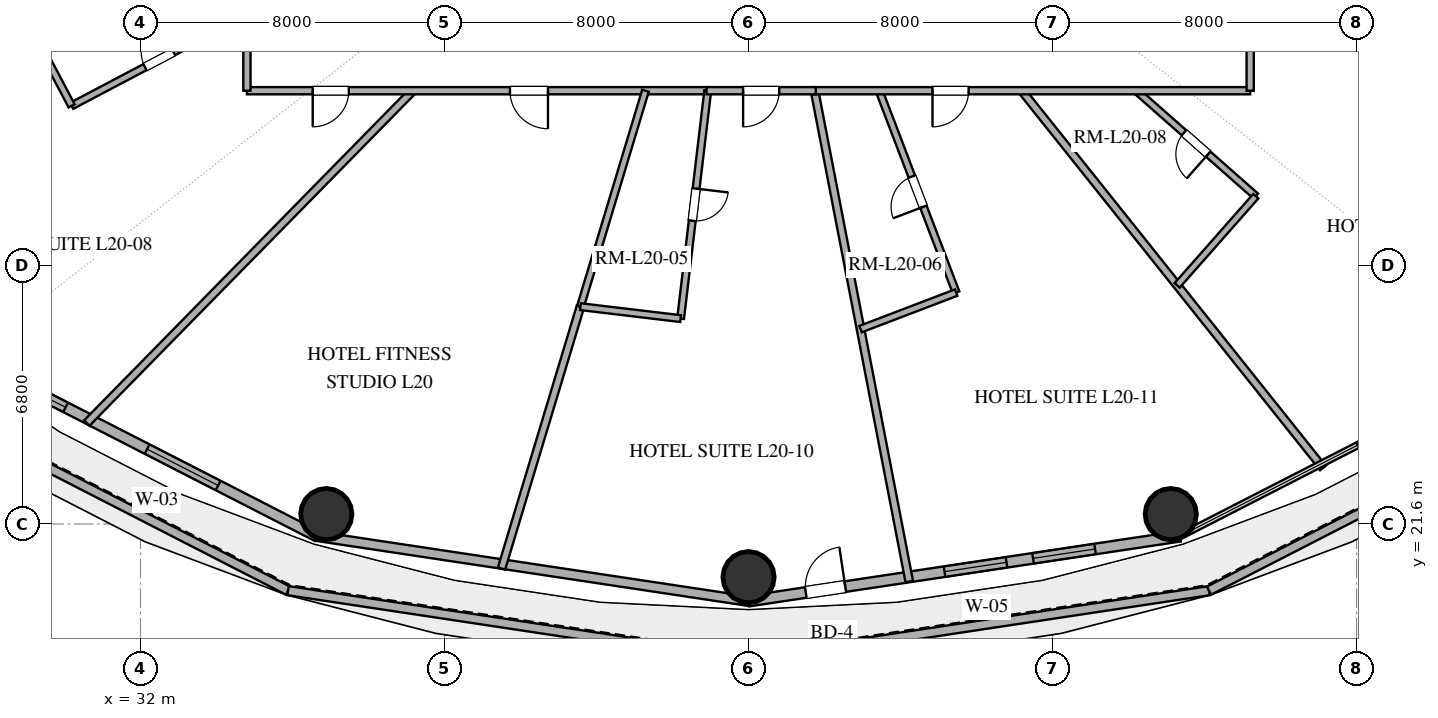
"""IFC4 building model, lengths in metres.
Left out: names, types, materials, properties, quantities, classifications, styles, units other than length and angle.
Written with IfcOpenShell. Run it as: python <this file> out.ifc"""

import sys

from ifc_helpers import new_model, si_unit, direction, frame, frame_2d, origin, origin_2d, place, context, subcontext, project, spatial, rectangle, hollow_circle, extrude, element, fill, save


model = new_model("IFC4")
c1 = context("Model", 3, precision=1e-05, world=origin(), true_north=direction((0.0, 1.0)))
c2 = subcontext(c1, "Body", "Model", "MODEL_VIEW")
j1 = project(units=[si_unit("LENGTHUNIT", "METRE"), si_unit("PLANEANGLEUNIT", "RADIAN")], contexts=[c1])
p1 = place(None, origin())
s1 = spatial("IfcSite", under=j1, at=p1, CompositionType="ELEMENT")
p2 = place(p1, origin())
s2 = spatial("IfcBuilding", under=s1, at=p2, CompositionType="ELEMENT")
p3 = place(p2, frame((0.0, 0.0, 84.0)))
s3 = spatial("IfcBuildingStorey", under=s2, at=p3, CompositionType="ELEMENT", Elevation=84.0)
for number, where, z_axis, x_axis in (
    (1, (36.89, 21.859, 0.0), (0.0, 0.0, 1.0), (1.0, 0.0, 0.0)),
    (2, (48.0, 20.2, 0.0), (0.0, 0.0, 1.0), (1.0, 0.0, 0.0)),
    (3, (59.11, 21.859, 0.0), (0.0, 0.0, 1.0), (1.0, 0.0, 0.0)),
):
    element("IfcColumn", number, at=place(p3, frame(where, z_axis=z_axis, x_axis=x_axis)), inside=s3, PredefinedType="COLUMN", context=c2, shape_type="SweptSolid", body=[
        extrude(hollow_circle(Radius=0.675, WallThickness=0.036, at=origin_2d()), origin(), (0.0, 0.0, 1.0), 3.38),
    ])
p4 = place(p3, frame((25.756, 25.044, 0.0), z_axis=(0.0, 0.0, 1.0), x_axis=(0.889663800129, -0.456616165658, 0.0)))
e4 = element("IfcWall", 4, at=p4, inside=s3, PredefinedType="PARAPET", context=c2, shape_type="SweptSolid", body=[
    extrude(rectangle(XDim=11.384, YDim=0.24, at=frame_2d((5.692, 0.0))), origin(), (0.0, 0.0, 1.0), 1.25),
])
for number, where, z_axis, x_axis in (
    (5, (35.884, 19.845, 0.0), (0.0, 0.0, 1.0), (0.989, -0.149, 0.0)),
    (6, (48.0, 18.02, 0.0), (0.0, 0.0, 1.0), (0.989, 0.149, 0.0)),
):
    element("IfcWall", number, at=place(p3, frame(where, z_axis=z_axis, x_axis=x_axis)), inside=s3, PredefinedType="PARAPET", context=c2, shape_type="SweptSolid", body=[
        extrude(rectangle(XDim=12.253, YDim=0.24, at=frame_2d((6.126, 0.0))), origin(), (0.0, 0.0, 1.0), 1.25),
    ])
p5 = place(p3, frame((60.116, 19.845, 0.0), z_axis=(0.0, 0.0, 1.0), x_axis=(0.889663800129, 0.456616165658, 0.0)))
e7 = element("IfcWall", 7, at=p5, inside=s3, PredefinedType="PARAPET", context=c2, shape_type="SweptSolid", body=[
    extrude(rectangle(XDim=11.384, YDim=0.24, at=frame_2d((5.692, 0.0))), origin(), (0.0, 0.0, 1.0), 1.25),
])
p6 = place(p3, frame((27.16, 26.14, 0.0), z_axis=(0.0, 0.0, 1.0), x_axis=(0.889959505023, -0.45603955905, 0.0)))
e8 = element("IfcWall", 8, at=p6, inside=s3, PredefinedType="SOLIDWALL", context=c2, shape_type="SweptSolid", body=[
    extrude(rectangle(XDim=10.662, YDim=0.28, at=frame_2d((5.331, 0.0))), origin(), (0.0, 0.0, 1.0), 3.38),
])
p7 = place(p6, frame((2.024, 0.0, 0.85)))
e9 = element("IfcOpeningElement", 9, at=p7, cuts=e8, PredefinedType="OPENING", context=c2, shape_type="SweptSolid", body=[
    extrude(rectangle(XDim=1.2, YDim=1.6, at=frame_2d((0.6, 0.8))), frame((0.0, 0.15, 0.0), z_axis=(0.0, -1.0, 0.0), x_axis=(1.0, 0.0, 0.0)), (0.0, 0.0, 1.0), 0.3),
])
p8 = place(p6, frame((5.635, 0.0, 0.85)))
e10 = element("IfcOpeningElement", 10, at=p8, cuts=e8, PredefinedType="OPENING", context=c2, shape_type="SweptSolid", body=[
    extrude(rectangle(XDim=2.1, YDim=2.2, at=frame_2d((1.05, 1.1))), frame((0.0, 0.15, 0.0), z_axis=(0.0, -1.0, 0.0), x_axis=(1.0, 0.0, 0.0)), (0.0, 0.0, 1.0), 0.3),
])
p9 = place(p3, frame((36.649, 21.277, 0.0), z_axis=(0.0, 0.0, 1.0), x_axis=(0.988877774656, -0.148730450117, 0.0)))
e11 = element("IfcWall", 11, at=p9, inside=s3, PredefinedType="SOLIDWALL", context=c2, shape_type="SweptSolid", body=[
    extrude(rectangle(XDim=11.479, YDim=0.25, at=frame_2d((5.74, 0.0))), origin(), (0.0, 0.0, 1.0), 3.38),
])
p10 = place(p3, frame((48.0, 19.57, 0.0), z_axis=(0.0, 0.0, 1.0), x_axis=(0.988877774656, 0.148730450117, 0.0)))
e12 = element("IfcWall", 12, at=p10, inside=s3, PredefinedType="SOLIDWALL", context=c2, shape_type="SweptSolid", body=[
    extrude(rectangle(XDim=11.479, YDim=0.28, at=frame_2d((5.74, 0.0))), origin(), (0.0, 0.0, 1.0), 3.38),
])
p11 = place(p10, frame((1.524, 0.0, 0.0)))
e13 = element("IfcOpeningElement", 13, at=p11, cuts=e12, PredefinedType="OPENING", context=c2, shape_type="SweptSolid", body=[
    extrude(rectangle(XDim=1.05, YDim=2.2, at=frame_2d((0.525, 1.1))), frame((0.0, 0.15, 0.0), z_axis=(0.0, -1.0, 0.0), x_axis=(1.0, 0.0, 0.0)), (0.0, 0.0, 1.0), 0.3),
])
p12 = place(p10, frame((5.215, 0.0, 0.85)))
e14 = element("IfcOpeningElement", 14, at=p12, cuts=e12, PredefinedType="OPENING", context=c2, shape_type="SweptSolid", body=[
    extrude(rectangle(XDim=1.65, YDim=2.0, at=frame_2d((0.825, 1.0))), frame((0.0, 0.15, 0.0), z_axis=(0.0, -1.0, 0.0), x_axis=(1.0, 0.0, 0.0)), (0.0, 0.0, 1.0), 0.3),
])
p13 = place(p10, frame((7.571, 0.0, 0.85)))
e15 = element("IfcOpeningElement", 15, at=p13, cuts=e12, PredefinedType="OPENING", context=c2, shape_type="SweptSolid", body=[
    extrude(rectangle(XDim=1.65, YDim=2.0, at=frame_2d((0.825, 1.0))), frame((0.0, 0.15, 0.0), z_axis=(0.0, -1.0, 0.0), x_axis=(1.0, 0.0, 0.0)), (0.0, 0.0, 1.0), 0.3),
])
p14 = place(p3, frame((39.167, 33.0, 0.0), z_axis=(0.0, 0.0, 1.0), x_axis=(-0.700440086719, -0.713711205542, 0.0)))
e16 = element("IfcWall", 16, at=p14, inside=s3, PredefinedType="PARTITIONING", context=c2, shape_type="SweptSolid", body=[
    extrude(rectangle(XDim=12.252, YDim=0.2, at=frame_2d((6.126, 0.0))), origin(), (0.0, 0.0, 1.0), 2.74),
])
p15 = place(p3, frame((34.8, 37.75, 0.0), z_axis=(0.0, 0.0, 1.0), x_axis=(-0.951880556228, -0.306469258939, 0.0)))
e17 = element("IfcWall", 17, at=p15, inside=s3, PredefinedType="PARTITIONING", context=c2, shape_type="SweptSolid", body=[
    extrude(rectangle(XDim=14.428, YDim=0.2, at=frame_2d((7.214, 0.0))), origin(), (0.0, 0.0, 1.0), 2.74),
])
p16 = place(p3, frame((41.5, 20.427, 0.0), z_axis=(0.0, 0.0, 1.0), x_axis=(0.288514746458, 0.957475451944, 0.0)))
e18 = element("IfcWall", 18, at=p16, inside=s3, PredefinedType="PARTITIONING", context=c2, shape_type="SweptSolid", body=[
    extrude(rectangle(XDim=7.197, YDim=0.2, at=frame_2d((3.599, 0.0))), origin(), (0.0, 0.0, 1.0), 2.74),
])
p17 = place(p3, frame((49.737, 33.0, 0.0), z_axis=(0.0, 0.0, 1.0), x_axis=(0.18949034594, -0.981882584017, 0.0)))
e19 = element("IfcWall", 19, at=p17, inside=s3, PredefinedType="PARTITIONING", context=c2, shape_type="SweptSolid", body=[
    extrude(rectangle(XDim=13.153, YDim=0.2, at=frame_2d((6.577, 0.0))), origin(), (0.0, 0.0, 1.0), 2.74),
])
p18 = place(p3, frame((61.2, 36.208, 0.0), z_axis=(0.0, 0.0, 1.0), x_axis=(0.915722078144, -0.401812239235, 0.0)))
e20 = element("IfcWall", 20, at=p18, inside=s3, PredefinedType="PARTITIONING", context=c2, shape_type="SweptSolid", body=[
    extrude(rectangle(XDim=12.915, YDim=0.2, at=frame_2d((6.458, 0.0))), origin(), (0.0, 0.0, 1.0), 2.74),
])
p19 = place(p3, frame((55.189, 33.0, 0.0), z_axis=(0.0, 0.0, 1.0), x_axis=(0.624085468444, -0.781356082767, 0.0)))
e21 = element("IfcWall", 21, at=p19, inside=s3, PredefinedType="PARTITIONING", context=c2, shape_type="SweptSolid", body=[
    extrude(rectangle(XDim=12.703, YDim=0.2, at=frame_2d((6.352, 0.0))), origin(), (0.0, 0.0, 1.0), 2.74),
])
p20 = place(p3, frame((46.959, 33.0, 0.0), z_axis=(0.0, 0.0, 1.0), x_axis=(-1.0, 0.0, 0.0)))
e22 = element("IfcWall", 22, at=p20, inside=s3, PredefinedType="PARTITIONING", context=c2, shape_type="SweptSolid", body=[
    extrude(rectangle(XDim=12.159, YDim=0.19, at=frame_2d((6.08, 0.0))), origin(), (0.0, 0.0, 1.0), 2.74),
])
p21 = place(p20, frame((4.237, 0.0, 0.0)))
e23 = element("IfcOpeningElement", 23, at=p21, cuts=e22, PredefinedType="OPENING", context=c2, shape_type="SweptSolid", body=[
    extrude(rectangle(XDim=1.0, YDim=2.2, at=frame_2d((0.5, 1.1))), frame((0.0, 0.105, 0.0), z_axis=(0.0, -1.0, 0.0), x_axis=(1.0, 0.0, 0.0)), (0.0, 0.0, 1.0), 0.21),
])
p22 = place(p20, frame((9.478, 0.0, 0.0)))
e24 = element("IfcOpeningElement", 24, at=p22, cuts=e22, PredefinedType="OPENING", context=c2, shape_type="SweptSolid", body=[
    extrude(rectangle(XDim=0.95, YDim=2.15, at=frame_2d((0.475, 1.075))), frame((0.0, 0.105, 0.0), z_axis=(0.0, -1.0, 0.0), x_axis=(1.0, 0.0, 0.0)), (0.0, 0.0, 1.0), 0.21),
])
p23 = place(p3, frame((46.927, 33.0, 0.0), z_axis=(0.0, 0.0, 1.0), x_axis=(-0.118379942802, -0.99296837268, 0.0)))
e25 = element("IfcWall", 25, at=p23, inside=s3, PredefinedType="PLUMBINGWALL", context=c2, shape_type="SweptSolid", body=[
    extrude(rectangle(XDim=6.039, YDim=0.18, at=frame_2d((3.019, 0.0))), origin(), (0.0, 0.0, 1.0), 2.74),
])
p24 = place(p23, frame((2.594, 0.0, 0.0)))
e26 = element("IfcOpeningElement", 26, at=p24, cuts=e25, PredefinedType="OPENING", context=c2, shape_type="SweptSolid", body=[
    extrude(rectangle(XDim=0.85, YDim=2.1, at=frame_2d((0.425, 1.05))), frame((0.0, 0.1, 0.0), z_axis=(0.0, -1.0, 0.0), x_axis=(1.0, 0.0, 0.0)), (0.0, 0.0, 1.0), 0.2),
])
p25 = place(p3, frame((43.576, 27.318, 0.0), z_axis=(0.0, 0.0, 1.0), x_axis=(0.288532873685, 0.957469989505, 0.0)))
e27 = element("IfcWall", 27, at=p25, inside=s3, PredefinedType="PLUMBINGWALL", context=c2, shape_type="SweptSolid", body=[
    extrude(rectangle(XDim=5.934, YDim=0.18, at=frame_2d((2.967, 0.0))), origin(), (0.0, 0.0, 1.0), 2.74),
])
p26 = place(p3, frame((53.463, 27.688, 0.0), z_axis=(0.0, 0.0, 1.0), x_axis=(-0.356604128264, 0.934255583716, 0.0)))
e28 = element("IfcWall", 28, at=p26, inside=s3, PredefinedType="PLUMBINGWALL", context=c2, shape_type="SweptSolid", body=[
    extrude(rectangle(XDim=5.686, YDim=0.18, at=frame_2d((2.843, 0.0))), origin(), (0.0, 0.0, 1.0), 2.74),
])
p27 = place(p26, frame((2.418, 0.0, 0.0)))
e29 = element("IfcOpeningElement", 29, at=p27, cuts=e28, PredefinedType="OPENING", context=c2, shape_type="SweptSolid", body=[
    extrude(rectangle(XDim=0.85, YDim=2.1, at=frame_2d((0.425, 1.05))), frame((0.0, 0.1, 0.0), z_axis=(0.0, -1.0, 0.0), x_axis=(1.0, 0.0, 0.0)), (0.0, 0.0, 1.0), 0.2),
])
p28 = place(p3, frame((30.187, 32.602, 0.0), z_axis=(0.0, 0.0, 1.0), x_axis=(0.884469007168, 0.466598944877, 0.0)))
e30 = element("IfcWall", 30, at=p28, inside=s3, PredefinedType="PLUMBINGWALL", context=c2, shape_type="SweptSolid", body=[
    extrude(rectangle(XDim=5.216, YDim=0.18, at=frame_2d((2.608, 0.0))), origin(), (0.0, 0.0, 1.0), 2.74),
])
p29 = place(p28, frame((2.183, 0.0, 0.0)))
e31 = element("IfcOpeningElement", 31, at=p29, cuts=e30, PredefinedType="OPENING", context=c2, shape_type="SweptSolid", body=[
    extrude(rectangle(XDim=0.85, YDim=2.1, at=frame_2d((0.425, 1.05))), frame((0.0, 0.1, 0.0), z_axis=(0.0, -1.0, 0.0), x_axis=(1.0, 0.0, 0.0)), (0.0, 0.0, 1.0), 0.2),
])
p30 = place(p3, frame((34.8, 33.0, 0.0), z_axis=(0.0, 0.0, 1.0), x_axis=(0.0, 1.0, 0.0)))
e32 = element("IfcWall", 32, at=p30, inside=s3, PredefinedType="PARTITIONING", context=c2, shape_type="SweptSolid", body=[
    extrude(rectangle(XDim=9.004, YDim=0.19, at=frame_2d((4.502, 0.0))), origin(), (0.0, 0.0, 1.0), 2.74),
])
p31 = place(p30, frame((6.385, 0.0, 0.0)))
e33 = element("IfcOpeningElement", 33, at=p31, cuts=e32, PredefinedType="OPENING", context=c2, shape_type="SweptSolid", body=[
    extrude(rectangle(XDim=0.95, YDim=2.15, at=frame_2d((0.475, 1.075))), frame((0.0, 0.105, 0.0), z_axis=(0.0, -1.0, 0.0), x_axis=(1.0, 0.0, 0.0)), (0.0, 0.0, 1.0), 0.21),
])
p32 = place(p3, frame((61.348, 30.225, 0.0), z_axis=(0.0, 0.0, 1.0), x_axis=(-0.749931272561, 0.661515749197, 0.0)))
e34 = element("IfcWall", 34, at=p32, inside=s3, PredefinedType="PLUMBINGWALL", context=c2, shape_type="SweptSolid", body=[
    extrude(rectangle(XDim=4.194, YDim=0.18, at=frame_2d((2.097, 0.0))), origin(), (0.0, 0.0, 1.0), 2.74),
])
p33 = place(p32, frame((1.672, 0.0, 0.0)))
e35 = element("IfcOpeningElement", 35, at=p33, cuts=e34, PredefinedType="OPENING", context=c2, shape_type="SweptSolid", body=[
    extrude(rectangle(XDim=0.85, YDim=2.1, at=frame_2d((0.425, 1.05))), frame((0.0, 0.1, 0.0), z_axis=(0.0, -1.0, 0.0), x_axis=(1.0, 0.0, 0.0)), (0.0, 0.0, 1.0), 0.2),
])
p34 = place(p3, frame((61.2, 33.0, 0.0), z_axis=(0.0, 0.0, 1.0), x_axis=(-1.0, 0.0, 0.0)))
e36 = element("IfcWall", 36, at=p34, inside=s3, PredefinedType="PARTITIONING", context=c2, shape_type="SweptSolid", body=[
    extrude(rectangle(XDim=11.496, YDim=0.19, at=frame_2d((5.748, 0.0))), origin(), (0.0, 0.0, 1.0), 2.74),
])
p35 = place(p34, frame((7.41, 0.0, 0.0)))
e37 = element("IfcOpeningElement", 37, at=p35, cuts=e36, PredefinedType="OPENING", context=c2, shape_type="SweptSolid", body=[
    extrude(rectangle(XDim=0.95, YDim=2.15, at=frame_2d((0.475, 1.075))), frame((0.0, 0.105, 0.0), z_axis=(0.0, -1.0, 0.0), x_axis=(1.0, 0.0, 0.0)), (0.0, 0.0, 1.0), 0.21),
])
p36 = place(p3, frame((28.535, 35.733, 0.0), z_axis=(0.0, 0.0, 1.0), x_axis=(0.466638742987, -0.884448010651, 0.0)))
e38 = element("IfcWall", 38, at=p36, inside=s3, PredefinedType="PLUMBINGWALL", context=c2, shape_type="SweptSolid", body=[
    extrude(rectangle(XDim=3.54, YDim=0.18, at=frame_2d((1.77, 0.0))), origin(), (0.0, 0.0, 1.0), 2.74),
])
p37 = place(p3, frame((61.2, 36.243, 0.0), z_axis=(0.0, 0.0, 1.0), x_axis=(0.0, -1.0, 0.0)))
e39 = element("IfcWall", 39, at=p37, inside=s3, PredefinedType="PARTITIONING", context=c2, shape_type="SweptSolid", body=[
    extrude(rectangle(XDim=3.243, YDim=0.19, at=frame_2d((1.621, 0.0))), origin(), (0.0, 0.0, 1.0), 2.74),
])
p38 = place(p37, frame((1.146, 0.0, 0.0)))
e40 = element("IfcOpeningElement", 40, at=p38, cuts=e39, PredefinedType="OPENING", context=c2, shape_type="SweptSolid", body=[
    extrude(rectangle(XDim=0.95, YDim=2.15, at=frame_2d((0.475, 1.075))), frame((0.0, 0.105, 0.0), z_axis=(0.0, -1.0, 0.0), x_axis=(1.0, 0.0, 0.0)), (0.0, 0.0, 1.0), 0.21),
])
p39 = place(p3, frame((59.279, 27.879, 0.0), z_axis=(0.0, 0.0, 1.0), x_axis=(0.661515810511, 0.749931218475, 0.0)))
e41 = element("IfcWall", 41, at=p39, inside=s3, PredefinedType="PLUMBINGWALL", context=c2, shape_type="SweptSolid", body=[
    extrude(rectangle(XDim=3.129, YDim=0.18, at=frame_2d((1.564, 0.0))), origin(), (0.0, 0.0, 1.0), 2.74),
])
p40 = place(p3, frame((49.77, 33.0, 0.0), z_axis=(0.0, 0.0, 1.0), x_axis=(-1.0, 0.0, 0.0)))
e42 = element("IfcWall", 42, at=p40, inside=s3, PredefinedType="PARTITIONING", context=c2, shape_type="SweptSolid", body=[
    extrude(rectangle(XDim=2.875, YDim=0.19, at=frame_2d((1.438, 0.0))), origin(), (0.0, 0.0, 1.0), 2.74),
])
p41 = place(p40, frame((0.962, 0.0, 0.0)))
e43 = element("IfcOpeningElement", 43, at=p41, cuts=e42, PredefinedType="OPENING", context=c2, shape_type="SweptSolid", body=[
    extrude(rectangle(XDim=0.95, YDim=2.15, at=frame_2d((0.475, 1.075))), frame((0.0, 0.105, 0.0), z_axis=(0.0, -1.0, 0.0), x_axis=(1.0, 0.0, 0.0)), (0.0, 0.0, 1.0), 0.21),
])
p42 = place(p3, frame((50.948, 26.728, 0.0), z_axis=(0.0, 0.0, 1.0), x_axis=(0.934244754769, 0.35663249738, 0.0)))
e44 = element("IfcWall", 44, at=p42, inside=s3, PredefinedType="PLUMBINGWALL", context=c2, shape_type="SweptSolid", body=[
    extrude(rectangle(XDim=2.692, YDim=0.18, at=frame_2d((1.346, 0.0))), origin(), (0.0, 0.0, 1.0), 2.74),
])
p43 = place(p3, frame((46.212, 27.004, 0.0), z_axis=(0.0, 0.0, 1.0), x_axis=(-0.992959714657, 0.118452543529, 0.0)))
e45 = element("IfcWall", 45, at=p43, inside=s3, PredefinedType="PLUMBINGWALL", context=c2, shape_type="SweptSolid", body=[
    extrude(rectangle(XDim=2.655, YDim=0.18, at=frame_2d((1.327, 0.0))), origin(), (0.0, 0.0, 1.0), 2.74),
])
p44 = place(p7, origin())
e46 = element("IfcWindow", 46, at=p44, inside=s3, PartitioningType="SINGLE_PANEL", PredefinedType="WINDOW", context=c2, shape_type="SweptSolid", body=[
    extrude(rectangle(XDim=1.2, YDim=1.6, at=frame_2d((0.6, 0.8))), frame((0.0, 0.03, 0.0), z_axis=(0.0, -1.0, 0.0), x_axis=(1.0, 0.0, 0.0)), (0.0, 0.0, 1.0), 0.06),
])
fill(e9, e46)
p45 = place(p8, origin())
e47 = element("IfcWindow", 47, at=p45, inside=s3, PartitioningType="SINGLE_PANEL", PredefinedType="WINDOW", context=c2, shape_type="SweptSolid", body=[
    extrude(rectangle(XDim=2.1, YDim=2.2, at=frame_2d((1.05, 1.1))), frame((0.0, 0.03, 0.0), z_axis=(0.0, -1.0, 0.0), x_axis=(1.0, 0.0, 0.0)), (0.0, 0.0, 1.0), 0.06),
])
fill(e10, e47)
p46 = place(p11, origin())
e48 = element("IfcDoor", 48, at=p46, inside=s3, OperationType="SINGLE_SWING_RIGHT", PredefinedType="DOOR", context=c2, shape_type="SweptSolid", body=[
    extrude(rectangle(XDim=1.05, YDim=2.2, at=frame_2d((0.525, 1.1))), frame((0.0, 0.025, 0.0), z_axis=(0.0, -1.0, 0.0), x_axis=(1.0, 0.0, 0.0)), (0.0, 0.0, 1.0), 0.05),
])
fill(e13, e48)
p47 = place(p12, origin())
e49 = element("IfcWindow", 49, at=p47, inside=s3, PartitioningType="SINGLE_PANEL", PredefinedType="WINDOW", context=c2, shape_type="SweptSolid", body=[
    extrude(rectangle(XDim=1.65, YDim=2.0, at=frame_2d((0.825, 1.0))), frame((0.0, 0.03, 0.0), z_axis=(0.0, -1.0, 0.0), x_axis=(1.0, 0.0, 0.0)), (0.0, 0.0, 1.0), 0.06),
])
fill(e14, e49)
p48 = place(p13, origin())
e50 = element("IfcWindow", 50, at=p48, inside=s3, PartitioningType="SINGLE_PANEL", PredefinedType="WINDOW", context=c2, shape_type="SweptSolid", body=[
    extrude(rectangle(XDim=1.65, YDim=2.0, at=frame_2d((0.825, 1.0))), frame((0.0, 0.03, 0.0), z_axis=(0.0, -1.0, 0.0), x_axis=(1.0, 0.0, 0.0)), (0.0, 0.0, 1.0), 0.06),
])
fill(e15, e50)
p49 = place(p21, origin())
e51 = element("IfcDoor", 51, at=p49, inside=s3, OperationType="SINGLE_SWING_LEFT", PredefinedType="DOOR", context=c2, shape_type="SweptSolid", body=[
    extrude(rectangle(XDim=1.0, YDim=2.2, at=frame_2d((0.5, 1.1))), frame((0.0, 0.025, 0.0), z_axis=(0.0, -1.0, 0.0), x_axis=(1.0, 0.0, 0.0)), (0.0, 0.0, 1.0), 0.05),
])
fill(e23, e51)
p50 = place(p22, origin())
e52 = element("IfcDoor", 52, at=p50, inside=s3, OperationType="SINGLE_SWING_RIGHT", PredefinedType="DOOR", context=c2, shape_type="SweptSolid", body=[
    extrude(rectangle(XDim=0.95, YDim=2.15, at=frame_2d((0.475, 1.075))), frame((0.0, 0.025, 0.0), z_axis=(0.0, -1.0, 0.0), x_axis=(1.0, 0.0, 0.0)), (0.0, 0.0, 1.0), 0.05),
])
fill(e24, e52)
p51 = place(p24, origin())
e53 = element("IfcDoor", 53, at=p51, inside=s3, OperationType="SINGLE_SWING_LEFT", PredefinedType="DOOR", context=c2, shape_type="SweptSolid", body=[
    extrude(rectangle(XDim=0.85, YDim=2.1, at=frame_2d((0.425, 1.05))), frame((0.0, 0.025, 0.0), z_axis=(0.0, -1.0, 0.0), x_axis=(1.0, 0.0, 0.0)), (0.0, 0.0, 1.0), 0.05),
])
fill(e26, e53)
p52 = place(p27, origin())
e54 = element("IfcDoor", 54, at=p52, inside=s3, OperationType="SINGLE_SWING_LEFT", PredefinedType="DOOR", context=c2, shape_type="SweptSolid", body=[
    extrude(rectangle(XDim=0.85, YDim=2.1, at=frame_2d((0.425, 1.05))), frame((0.0, 0.025, 0.0), z_axis=(0.0, -1.0, 0.0), x_axis=(1.0, 0.0, 0.0)), (0.0, 0.0, 1.0), 0.05),
])
fill(e29, e54)
p53 = place(p29, origin())
e55 = element("IfcDoor", 55, at=p53, inside=s3, OperationType="SINGLE_SWING_RIGHT", PredefinedType="DOOR", context=c2, shape_type="SweptSolid", body=[
    extrude(rectangle(XDim=0.85, YDim=2.1, at=frame_2d((0.425, 1.05))), frame((0.0, 0.025, 0.0), z_axis=(0.0, -1.0, 0.0), x_axis=(1.0, 0.0, 0.0)), (0.0, 0.0, 1.0), 0.05),
])
fill(e31, e55)
p54 = place(p33, origin())
e56 = element("IfcDoor", 56, at=p54, inside=s3, OperationType="SINGLE_SWING_LEFT", PredefinedType="DOOR", context=c2, shape_type="SweptSolid", body=[
    extrude(rectangle(XDim=0.85, YDim=2.1, at=frame_2d((0.425, 1.05))), frame((0.0, 0.025, 0.0), z_axis=(0.0, -1.0, 0.0), x_axis=(1.0, 0.0, 0.0)), (0.0, 0.0, 1.0), 0.05),
])
fill(e35, e56)
p55 = place(p35, origin())
e57 = element("IfcDoor", 57, at=p55, inside=s3, OperationType="SINGLE_SWING_RIGHT", PredefinedType="DOOR", context=c2, shape_type="SweptSolid", body=[
    extrude(rectangle(XDim=0.95, YDim=2.15, at=frame_2d((0.475, 1.075))), frame((0.0, 0.025, 0.0), z_axis=(0.0, -1.0, 0.0), x_axis=(1.0, 0.0, 0.0)), (0.0, 0.0, 1.0), 0.05),
])
fill(e37, e57)
p56 = place(p41, origin())
e58 = element("IfcDoor", 58, at=p56, inside=s3, OperationType="SINGLE_SWING_RIGHT", PredefinedType="DOOR", context=c2, shape_type="SweptSolid", body=[
    extrude(rectangle(XDim=0.95, YDim=2.15, at=frame_2d((0.475, 1.075))), frame((0.0, 0.025, 0.0), z_axis=(0.0, -1.0, 0.0), x_axis=(1.0, 0.0, 0.0)), (0.0, 0.0, 1.0), 0.05),
])
fill(e43, e58)
save(model, sys.argv[1])
